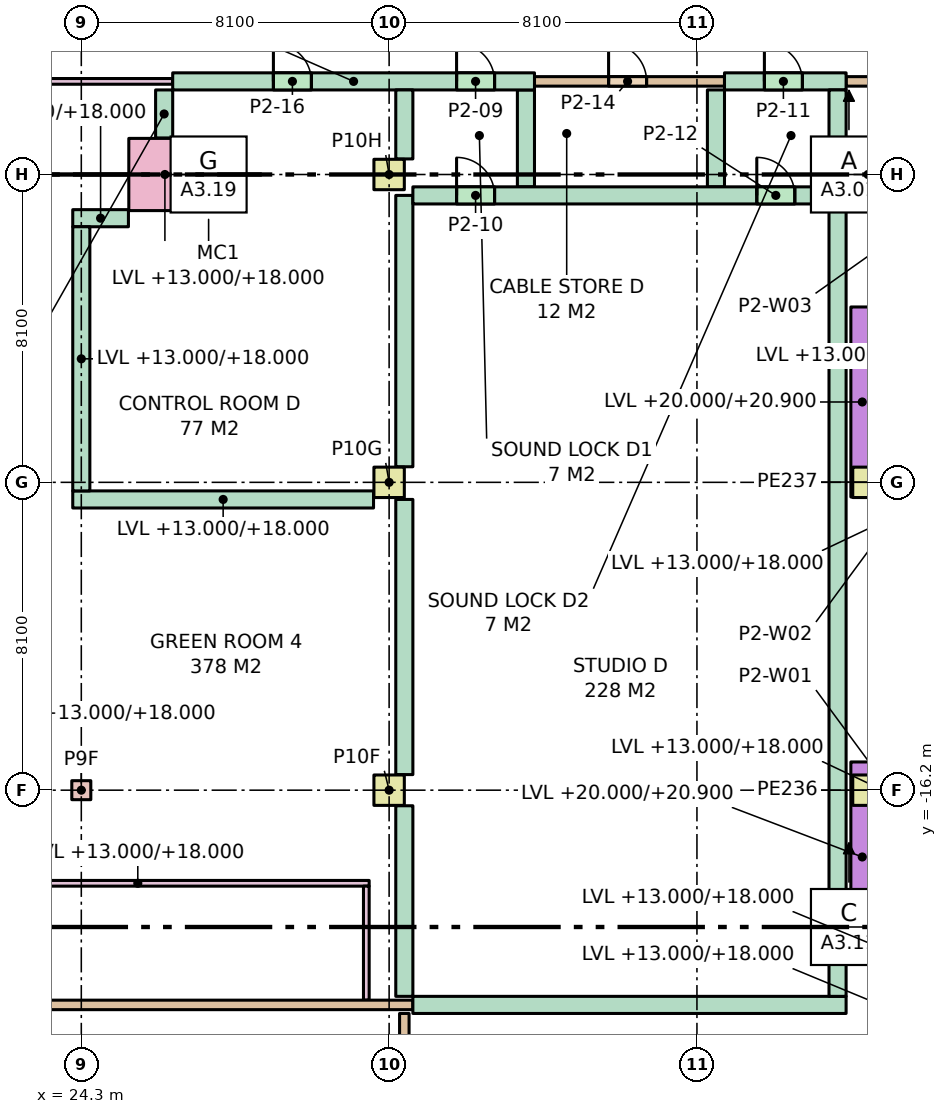
"""IFC4 building model, lengths in metres.
Left out: names, types, materials, properties, quantities, classifications, styles, units other than length and angle.
Written with IfcOpenShell. Run it as: python <this file> out.ifc"""

import sys

from ifc_helpers import new_model, si_unit, direction, frame, frame_2d, origin, origin_2d, place, context, subcontext, project, spatial, rectangle, extrude, element, fill, save


model = new_model("IFC4")
c1 = context("Model", 3, precision=1e-05, world=origin(), true_north=direction((0.0, 1.0)))
c2 = subcontext(c1, "Body", "Model", "MODEL_VIEW")
j1 = project(units=[si_unit("LENGTHUNIT", "METRE"), si_unit("PLANEANGLEUNIT", "RADIAN")], contexts=[c1])
p1 = place(None, origin())
s1 = spatial("IfcSite", under=j1, at=p1, CompositionType="ELEMENT")
p2 = place(p1, origin())
s2 = spatial("IfcBuilding", under=s1, at=p2, CompositionType="ELEMENT")
p3 = place(p2, frame((0.0, 0.0, 13.0)))
s3 = spatial("IfcBuildingStorey", under=s2, at=p3, CompositionType="ELEMENT", Elevation=13.0)
p4 = place(p3, frame((24.3, -16.2, 0.0), z_axis=(0.0, 0.0, 1.0), x_axis=(1.0, 0.0, 0.0)))
e1 = element("IfcColumn", 1, at=p4, inside=s3, PredefinedType="COLUMN", context=c2, shape_type="SweptSolid", body=[
    extrude(rectangle(XDim=0.5, YDim=0.5, at=origin_2d()), origin(), (0.0, 0.0, 1.0), 7.0),
])
for number, where, z_axis, x_axis in (
    (2, (32.4, -16.2, 0.0), (0.0, 0.0, 1.0), (1.0, 0.0, 0.0)),
    (3, (32.4, -8.1, 0.0), (0.0, 0.0, 1.0), (1.0, 0.0, 0.0)),
    (4, (32.4, 0.0, 0.0), (0.0, 0.0, 1.0), (1.0, 0.0, 0.0)),
    (5, (45.0, -16.2, 0.0), (0.0, 0.0, 1.0), (1.0, 0.0, 0.0)),
    (6, (45.0, -8.1, 0.0), (0.0, 0.0, 1.0), (1.0, 0.0, 0.0)),
    (7, (45.0, 0.0, 0.0), (0.0, 0.0, 1.0), (1.0, 0.0, 0.0)),
):
    element("IfcColumn", number, at=place(p3, frame(where, z_axis=z_axis, x_axis=x_axis)), inside=s3, PredefinedType="COLUMN", context=c2, shape_type="SweptSolid", body=[
        extrude(rectangle(XDim=0.8, YDim=0.8, at=origin_2d()), origin(), (0.0, 0.0, 1.0), 7.0),
    ])
p5 = place(p3, frame((26.5, 0.0, 0.0), z_axis=(0.0, 0.0, 1.0), x_axis=(0.0, 1.0, 0.0)))
e8 = element("IfcColumn", 8, at=p5, inside=s3, PredefinedType="COLUMN", context=c2, shape_type="SweptSolid", body=[
    extrude(rectangle(XDim=1.9, YDim=1.9, at=origin_2d()), origin(), (0.0, 0.0, 1.0), 5.0),
])
for number, where, z_axis, x_axis in (
    (9, (44.85, -20.458, 7.0), (0.0, 0.0, 1.0), (0.0, 1.0, 0.0)),
    (10, (44.85, -8.486, 7.0), (0.0, 0.0, 1.0), (0.0, 1.0, 0.0)),
):
    element("IfcWall", number, at=place(p3, frame(where, z_axis=z_axis, x_axis=x_axis)), inside=s3, PredefinedType="PARAPET", context=c2, shape_type="SweptSolid", body=[
        extrude(rectangle(XDim=5.0, YDim=0.6, at=frame_2d((2.5, 0.0))), origin(), (0.0, 0.0, 1.0), 0.9),
    ])
p6 = place(p3, frame((36.225, 2.45, 0.0), z_axis=(0.0, 0.0, 1.0), x_axis=(1.0, 0.0, 0.0)))
e11 = element("IfcWall", 11, at=p6, inside=s3, PredefinedType="PARTITIONING", context=c2, shape_type="SweptSolid", body=[
    extrude(rectangle(XDim=5.0, YDim=0.25, at=frame_2d((2.5, 0.0))), origin(), (0.0, 0.0, 1.0), 6.68),
])
p7 = place(p6, frame((1.95, 0.0, 0.0)))
e12 = element("IfcOpeningElement", 12, at=p7, cuts=e11, PredefinedType="OPENING", context=c2, shape_type="SweptSolid", body=[
    extrude(rectangle(XDim=1.0, YDim=2.1, at=frame_2d((0.5, 1.05))), frame((0.0, 0.135, 0.0), z_axis=(0.0, -1.0, 0.0), x_axis=(1.0, 0.0, 0.0)), (0.0, 0.0, 1.0), 0.27),
])
for number, where, z_axis, x_axis in (
    (13, (36.0, -0.325, 0.0), (0.0, 0.0, 1.0), (0.0, 1.0, 0.0)),
    (14, (41.0, -0.325, 0.0), (0.0, 0.0, 1.0), (0.0, 1.0, 0.0)),
):
    element("IfcWall", number, at=place(p3, frame(where, z_axis=z_axis, x_axis=x_axis)), inside=s3, PredefinedType="PARTITIONING", context=c2, shape_type="SweptSolid", body=[
        extrude(rectangle(XDim=2.55, YDim=0.45, at=frame_2d((1.275, 0.0))), origin(), (0.0, 0.0, 1.0), 6.68),
    ])
p8 = place(p3, frame((26.705, 2.45, 0.0), z_axis=(0.0, 0.0, 1.0), x_axis=(1.0, 0.0, 0.0)))
e15 = element("IfcWall", 15, at=p8, inside=s3, PredefinedType="PARTITIONING", context=c2, shape_type="SweptSolid", body=[
    extrude(rectangle(XDim=9.52, YDim=0.45, at=frame_2d((4.76, 0.0))), origin(), (0.0, 0.0, 1.0), 5.0),
])
p9 = place(p8, frame((7.47, 0.0, 0.0)))
e16 = element("IfcOpeningElement", 16, at=p9, cuts=e15, PredefinedType="OPENING", context=c2, shape_type="SweptSolid", body=[
    extrude(rectangle(XDim=1.0, YDim=2.1, at=frame_2d((0.5, 1.05))), frame((0.0, 0.235, 0.0), z_axis=(0.0, -1.0, 0.0), x_axis=(1.0, 0.0, 0.0)), (0.0, 0.0, 1.0), 0.47),
])
p10 = place(p8, frame((2.65, 0.0, 0.0)))
e17 = element("IfcOpeningElement", 17, at=p10, cuts=e15, PredefinedType="OPENING", context=c2, shape_type="SweptSolid", body=[
    extrude(rectangle(XDim=1.0, YDim=2.1, at=frame_2d((0.5, 1.05))), frame((0.0, 0.235, 0.0), z_axis=(0.0, -1.0, 0.0), x_axis=(1.0, 0.0, 0.0)), (0.0, 0.0, 1.0), 0.47),
])
p11 = place(p3, frame((32.8, 0.41, 0.0), z_axis=(0.0, 0.0, 1.0), x_axis=(0.0, 1.0, 0.0)))
e18 = element("IfcWall", 18, at=p11, inside=s3, PredefinedType="PARTITIONING", context=c2, shape_type="SweptSolid", body=[
    extrude(rectangle(XDim=1.815, YDim=0.45, at=frame_2d((0.908, 0.0))), origin(), (0.0, 0.0, 1.0), 6.68),
])
p12 = place(p3, frame((24.075, -8.55, 0.0), z_axis=(0.0, 0.0, 1.0), x_axis=(1.0, 0.0, 0.0)))
e19 = element("IfcWall", 19, at=p12, inside=s3, PredefinedType="PARTITIONING", context=c2, shape_type="SweptSolid", body=[
    extrude(rectangle(XDim=7.915, YDim=0.45, at=frame_2d((3.958, 0.0))), origin(), (0.0, 0.0, 1.0), 5.0),
])
p13 = place(p3, frame((24.075, -1.15, 0.0), z_axis=(0.0, 0.0, 1.0), x_axis=(1.0, 0.0, 0.0)))
e20 = element("IfcWall", 20, at=p13, inside=s3, PredefinedType="PARTITIONING", context=c2, shape_type="SweptSolid", body=[
    extrude(rectangle(XDim=1.465, YDim=0.45, at=frame_2d((0.732, 0.0))), origin(), (0.0, 0.0, 1.0), 5.0),
])
p14 = place(p3, frame((24.3, -8.325, 0.0), z_axis=(0.0, 0.0, 1.0), x_axis=(0.0, 1.0, 0.0)))
e21 = element("IfcWall", 21, at=p14, inside=s3, PredefinedType="PARTITIONING", context=c2, shape_type="SweptSolid", body=[
    extrude(rectangle(XDim=6.95, YDim=0.45, at=frame_2d((3.475, 0.0))), origin(), (0.0, 0.0, 1.0), 5.0),
])
p15 = place(p3, frame((26.48, 0.96, 0.0), z_axis=(0.0, 0.0, 1.0), x_axis=(0.0, 1.0, 0.0)))
e22 = element("IfcWall", 22, at=p15, inside=s3, PredefinedType="PARTITIONING", context=c2, shape_type="SweptSolid", body=[
    extrude(rectangle(XDim=1.265, YDim=0.45, at=frame_2d((0.633, 0.0))), origin(), (0.0, 0.0, 1.0), 5.0),
])
p16 = place(p3, frame((32.8, -7.69, 0.0), z_axis=(0.0, 0.0, 1.0), x_axis=(0.0, 1.0, 0.0)))
e23 = element("IfcWall", 23, at=p16, inside=s3, PredefinedType="PARTITIONING", context=c2, shape_type="SweptSolid", body=[
    extrude(rectangle(XDim=7.14, YDim=0.45, at=frame_2d((3.57, 0.0))), origin(), (0.0, 0.0, 1.0), 6.68),
])
p17 = place(p3, frame((41.225, 2.45, 0.0), z_axis=(0.0, 0.0, 1.0), x_axis=(1.0, 0.0, 0.0)))
e24 = element("IfcWall", 24, at=p17, inside=s3, PredefinedType="PARTITIONING", context=c2, shape_type="SweptSolid", body=[
    extrude(rectangle(XDim=3.2, YDim=0.45, at=frame_2d((1.6, 0.0))), origin(), (0.0, 0.0, 1.0), 6.68),
])
p18 = place(p17, frame((1.05, 0.0, 0.0)))
e25 = element("IfcOpeningElement", 25, at=p18, cuts=e24, PredefinedType="OPENING", context=c2, shape_type="SweptSolid", body=[
    extrude(rectangle(XDim=1.0, YDim=2.1, at=frame_2d((0.5, 1.05))), frame((0.0, 0.235, 0.0), z_axis=(0.0, -1.0, 0.0), x_axis=(1.0, 0.0, 0.0)), (0.0, 0.0, 1.0), 0.47),
])
p19 = place(p3, frame((44.425, 2.45, 0.0), z_axis=(0.0, 0.0, 1.0), x_axis=(1.0, 0.0, 0.0)))
e26 = element("IfcWall", 26, at=p19, inside=s3, PredefinedType="PARTITIONING", context=c2, shape_type="SweptSolid", body=[
    extrude(rectangle(XDim=1.075, YDim=0.25, at=frame_2d((0.538, 0.0))), origin(), (0.0, 0.0, 1.0), 6.68),
])
p20 = place(p3, frame((13.325, 2.45, 0.0), z_axis=(0.0, 0.0, 1.0), x_axis=(1.0, 0.0, 0.0)))
e27 = element("IfcWall", 27, at=p20, inside=s3, PredefinedType="PARTITIONING", context=c2, shape_type="SweptSolid", body=[
    extrude(rectangle(XDim=13.38, YDim=0.15, at=frame_2d((6.69, 0.0))), origin(), (0.0, 0.0, 1.0), 5.0),
])
p21 = place(p3, frame((33.025, -0.55, 0.0), z_axis=(0.0, 0.0, 1.0), x_axis=(1.0, 0.0, 0.0)))
e28 = element("IfcWall", 28, at=p21, inside=s3, PredefinedType="PARTITIONING", context=c2, shape_type="SweptSolid", body=[
    extrude(rectangle(XDim=10.95, YDim=0.45, at=frame_2d((5.475, 0.0))), origin(), (0.0, 0.0, 1.0), 6.68),
])
p22 = place(p21, frame((1.15, 0.0, 0.0)))
e29 = element("IfcOpeningElement", 29, at=p22, cuts=e28, PredefinedType="OPENING", context=c2, shape_type="SweptSolid", body=[
    extrude(rectangle(XDim=1.0, YDim=2.1, at=frame_2d((0.5, 1.05))), frame((0.0, 0.235, 0.0), z_axis=(0.0, -1.0, 0.0), x_axis=(1.0, 0.0, 0.0)), (0.0, 0.0, 1.0), 0.47),
])
p23 = place(p21, frame((9.05, 0.0, 0.0)))
e30 = element("IfcOpeningElement", 30, at=p23, cuts=e28, PredefinedType="OPENING", context=c2, shape_type="SweptSolid", body=[
    extrude(rectangle(XDim=1.0, YDim=2.1, at=frame_2d((0.5, 1.05))), frame((0.0, 0.235, 0.0), z_axis=(0.0, -1.0, 0.0), x_axis=(1.0, 0.0, 0.0)), (0.0, 0.0, 1.0), 0.47),
])
p24 = place(p3, frame((19.698, -18.65, 0.0), z_axis=(0.0, 0.0, 1.0), x_axis=(1.0, 0.0, 0.0)))
e31 = element("IfcWall", 31, at=p24, inside=s3, PredefinedType="PARTITIONING", context=c2, shape_type="SweptSolid", body=[
    extrude(rectangle(XDim=12.177, YDim=0.15, at=frame_2d((6.088, 0.0))), origin(), (0.0, 0.0, 1.0), 5.0),
])
p25 = place(p3, frame((31.8, -21.725, 0.0), z_axis=(0.0, 0.0, 1.0), x_axis=(0.0, 1.0, 0.0)))
e32 = element("IfcWall", 32, at=p25, inside=s3, PredefinedType="PARTITIONING", context=c2, shape_type="SweptSolid", body=[
    extrude(rectangle(XDim=3.0, YDim=0.15, at=frame_2d((1.5, 0.0))), origin(), (0.0, 0.0, 1.0), 6.68),
])
p26 = place(p3, frame((22.854, -21.85, 0.0), z_axis=(0.0, 0.0, 1.0), x_axis=(1.0, 0.0, 0.0)))
e33 = element("IfcWall", 33, at=p26, inside=s3, PredefinedType="PARTITIONING", context=c2, shape_type="SweptSolid", body=[
    extrude(rectangle(XDim=10.171, YDim=0.25, at=frame_2d((5.086, 0.0))), origin(), (0.0, 0.0, 1.0), 6.68),
])
p27 = place(p3, frame((33.025, -21.85, 0.0), z_axis=(0.0, 0.0, 1.0), x_axis=(1.0, 0.0, 0.0)))
e34 = element("IfcWall", 34, at=p27, inside=s3, PredefinedType="PARTITIONING", context=c2, shape_type="SweptSolid", body=[
    extrude(rectangle(XDim=11.4, YDim=0.45, at=frame_2d((5.7, 0.0))), origin(), (0.0, 0.0, 1.0), 6.68),
])
p28 = place(p3, frame((44.2, -21.625, 0.0), z_axis=(0.0, 0.0, 1.0), x_axis=(0.0, 1.0, 0.0)))
e35 = element("IfcWall", 35, at=p28, inside=s3, PredefinedType="PARTITIONING", context=c2, shape_type="SweptSolid", body=[
    extrude(rectangle(XDim=23.85, YDim=0.45, at=frame_2d((11.925, 0.0))), origin(), (0.0, 0.0, 1.0), 6.68),
])
p29 = place(p3, frame((32.8, -23.89, 0.0), z_axis=(0.0, 0.0, 1.0), x_axis=(0.0, 1.0, 0.0)))
e36 = element("IfcWall", 36, at=p29, inside=s3, PredefinedType="PARTITIONING", context=c2, shape_type="SweptSolid", body=[
    extrude(rectangle(XDim=1.815, YDim=0.25, at=frame_2d((0.907, 0.0))), origin(), (0.0, 0.0, 1.0), 6.68),
])
p30 = place(p3, frame((32.8, -21.625, 0.0), z_axis=(0.0, 0.0, 1.0), x_axis=(0.0, 1.0, 0.0)))
e37 = element("IfcWall", 37, at=p30, inside=s3, PredefinedType="PARTITIONING", context=c2, shape_type="SweptSolid", body=[
    extrude(rectangle(XDim=5.015, YDim=0.45, at=frame_2d((2.507, 0.0))), origin(), (0.0, 0.0, 1.0), 6.68),
])
p31 = place(p3, frame((32.8, -15.79, 0.0), z_axis=(0.0, 0.0, 1.0), x_axis=(0.0, 1.0, 0.0)))
e38 = element("IfcWall", 38, at=p31, inside=s3, PredefinedType="PARTITIONING", context=c2, shape_type="SweptSolid", body=[
    extrude(rectangle(XDim=7.24, YDim=0.45, at=frame_2d((3.62, 0.0))), origin(), (0.0, 0.0, 1.0), 6.68),
])
p32 = place(p9, origin())
e39 = element("IfcDoor", 39, at=p32, inside=s3, OperationType="SINGLE_SWING_LEFT", PredefinedType="DOOR", context=c2, shape_type="SweptSolid", body=[
    extrude(rectangle(XDim=1.0, YDim=2.1, at=frame_2d((0.5, 1.05))), frame((0.0, 0.025, 0.0), z_axis=(0.0, -1.0, 0.0), x_axis=(1.0, 0.0, 0.0)), (0.0, 0.0, 1.0), 0.05),
])
fill(e16, e39)
p33 = place(p22, origin())
e40 = element("IfcDoor", 40, at=p33, inside=s3, OperationType="SINGLE_SWING_LEFT", PredefinedType="DOOR", context=c2, shape_type="SweptSolid", body=[
    extrude(rectangle(XDim=1.0, YDim=2.1, at=frame_2d((0.5, 1.05))), frame((0.0, 0.025, 0.0), z_axis=(0.0, -1.0, 0.0), x_axis=(1.0, 0.0, 0.0)), (0.0, 0.0, 1.0), 0.05),
])
fill(e29, e40)
p34 = place(p18, origin())
e41 = element("IfcDoor", 41, at=p34, inside=s3, OperationType="SINGLE_SWING_LEFT", PredefinedType="DOOR", context=c2, shape_type="SweptSolid", body=[
    extrude(rectangle(XDim=1.0, YDim=2.1, at=frame_2d((0.5, 1.05))), frame((0.0, 0.025, 0.0), z_axis=(0.0, -1.0, 0.0), x_axis=(1.0, 0.0, 0.0)), (0.0, 0.0, 1.0), 0.05),
])
fill(e25, e41)
p35 = place(p23, origin())
e42 = element("IfcDoor", 42, at=p35, inside=s3, OperationType="SINGLE_SWING_LEFT", PredefinedType="DOOR", context=c2, shape_type="SweptSolid", body=[
    extrude(rectangle(XDim=1.0, YDim=2.1, at=frame_2d((0.5, 1.05))), frame((0.0, 0.025, 0.0), z_axis=(0.0, -1.0, 0.0), x_axis=(1.0, 0.0, 0.0)), (0.0, 0.0, 1.0), 0.05),
])
fill(e30, e42)
p36 = place(p7, origin())
e43 = element("IfcDoor", 43, at=p36, inside=s3, OperationType="SINGLE_SWING_LEFT", PredefinedType="DOOR", context=c2, shape_type="SweptSolid", body=[
    extrude(rectangle(XDim=1.0, YDim=2.1, at=frame_2d((0.5, 1.05))), frame((0.0, 0.025, 0.0), z_axis=(0.0, -1.0, 0.0), x_axis=(1.0, 0.0, 0.0)), (0.0, 0.0, 1.0), 0.05),
])
fill(e12, e43)
p37 = place(p10, origin())
e44 = element("IfcDoor", 44, at=p37, inside=s3, OperationType="SINGLE_SWING_LEFT", PredefinedType="DOOR", context=c2, shape_type="SweptSolid", body=[
    extrude(rectangle(XDim=1.0, YDim=2.1, at=frame_2d((0.5, 1.05))), frame((0.0, 0.025, 0.0), z_axis=(0.0, -1.0, 0.0), x_axis=(1.0, 0.0, 0.0)), (0.0, 0.0, 1.0), 0.05),
])
fill(e17, e44)
save(model, sys.argv[1])
